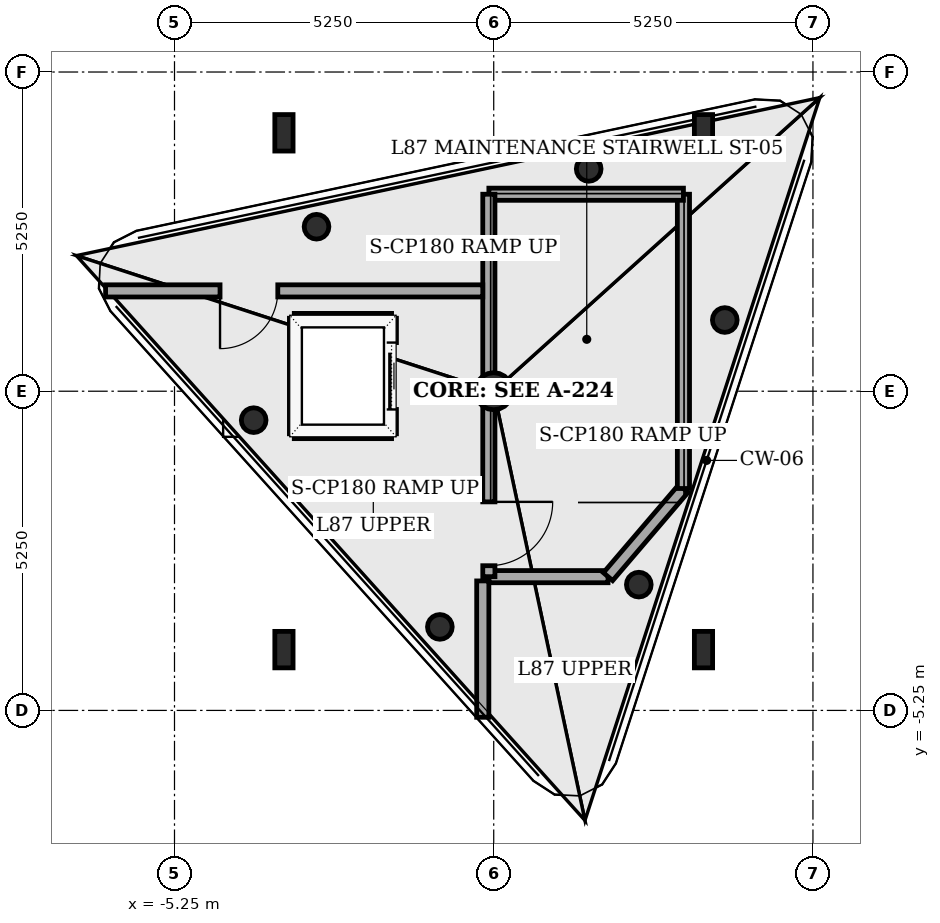
"""IFC4 building model, lengths in metres.
Left out: names, types, materials, properties, quantities, classifications, styles, units other than length and angle.
Written with IfcOpenShell. Run it as: python <this file> out.ifc"""

import sys

from ifc_helpers import new_model, si_unit, direction, frame, frame_2d, origin, origin_2d, place, context, subcontext, project, spatial, rectangle, hollow_circle, i_section, extrude, element, fill, save


model = new_model("IFC4")
c1 = context("Model", 3, precision=1e-05, world=origin(), true_north=direction((0.0, 1.0)))
c2 = subcontext(c1, "Body", "Model", "MODEL_VIEW")
j1 = project(units=[si_unit("LENGTHUNIT", "METRE"), si_unit("PLANEANGLEUNIT", "RADIAN")], contexts=[c1])
p1 = place(None, origin())
s1 = spatial("IfcSite", under=j1, at=p1, CompositionType="ELEMENT")
p2 = place(p1, origin())
s2 = spatial("IfcBuilding", under=s1, at=p2, CompositionType="ELEMENT")
p3 = place(p2, frame((0.0, 0.0, 339.2)))
s3 = spatial("IfcBuildingStorey", under=s2, at=p3, CompositionType="ELEMENT", Elevation=339.2)
for number, where, z_axis, x_axis in (
    (1, (-3.45, -4.25, 0.0), (0.0, 0.0, 1.0), (1.0, 0.0, 0.0)),
    (2, (3.45, -4.25, 0.0), (0.0, 0.0, 1.0), (1.0, 0.0, 0.0)),
    (3, (3.45, 4.25, 0.0), (0.0, 0.0, 1.0), (1.0, 0.0, 0.0)),
    (4, (-3.45, 4.25, 0.0), (0.0, 0.0, 1.0), (1.0, 0.0, 0.0)),
):
    element("IfcColumn", number, at=place(p3, frame(where, z_axis=z_axis, x_axis=x_axis)), inside=s3, PredefinedType="COLUMN", context=c2, shape_type="SweptSolid", body=[
        extrude(i_section(OverallWidth=0.3, OverallDepth=0.6, WebThickness=0.015, FlangeThickness=0.03, at=origin_2d()), origin(), (0.0, 0.0, 1.0), 4.2),
    ])
for number, where, z_axis, x_axis in (
    (5, (2.386, -3.181, 0.0), (0.0, 0.0, 1.0), (0.309, 0.951, 0.0)),
    (6, (3.8, 1.171, 0.0), (0.0, 0.0, 1.0), (0.309, 0.951, 0.0)),
    (7, (1.562, 3.657, 0.0), (0.0, 0.0, 1.0), (0.309, 0.951, 0.0)),
    (8, (-2.914, 2.706, 0.0), (0.0, 0.0, 1.0), (0.309, 0.951, 0.0)),
    (9, (-3.948, -0.476, 0.0), (0.0, 0.0, 1.0), (0.309, 0.951, 0.0)),
    (10, (-0.886, -3.876, 0.0), (0.0, 0.0, 1.0), (0.309, 0.951, 0.0)),
):
    element("IfcColumn", number, at=place(p3, frame(where, z_axis=z_axis, x_axis=x_axis)), inside=s3, PredefinedType="COLUMN", context=c2, shape_type="SweptSolid", body=[
        extrude(hollow_circle(Radius=0.203, WallThickness=0.02, at=origin_2d()), origin(), (0.0, 0.0, 1.0), 4.2),
    ])
p4 = place(p3, frame((0.0, 0.0, 4.02), z_axis=(0.0, 0.0, 1.0), x_axis=(1.0, 0.0, 0.0)))
e11 = element("IfcColumn", 11, at=p4, inside=s3, PredefinedType="USERDEFINED", context=c2, shape_type="SweptSolid", body=[
    extrude(hollow_circle(Radius=0.305, WallThickness=0.03, at=origin_2d()), origin(), (0.0, 0.0, 1.0), 5.78),
])
p5 = place(p3, frame((-0.08, -3.05, 0.0), z_axis=(0.0, 0.0, 1.0), x_axis=(1.0, 0.0, 0.0)))
e12 = element("IfcWall", 12, at=p5, inside=s3, PredefinedType="SOLIDWALL", context=c2, shape_type="SweptSolid", body=[
    extrude(rectangle(XDim=1.96, YDim=0.2, at=frame_2d((0.98, 0.0))), origin(), (0.0, 0.0, 1.0), 2.185),
])
p6 = place(p3, frame((1.88, -3.05, 0.0), z_axis=(0.0, 0.0, 1.0), x_axis=(0.650011257585, 0.759924578503, 0.0)))
e13 = element("IfcWall", 13, at=p6, inside=s3, PredefinedType="SOLIDWALL", context=c2, shape_type="SweptSolid", body=[
    extrude(rectangle(XDim=1.908, YDim=0.2, at=frame_2d((0.954, 0.0))), origin(), (0.0, 0.0, 1.0), 2.505),
])
p7 = place(p3, frame((3.12, -1.6, 0.0), z_axis=(0.0, 0.0, 1.0), x_axis=(0.0, 1.0, 0.0)))
e14 = element("IfcWall", 14, at=p7, inside=s3, PredefinedType="SOLIDWALL", context=c2, shape_type="SweptSolid", body=[
    extrude(rectangle(XDim=4.84, YDim=0.2, at=frame_2d((2.42, 0.0))), origin(), (0.0, 0.0, 1.0), 2.505),
])
p8 = place(p3, frame((3.12, 3.24, 0.0), z_axis=(0.0, 0.0, 1.0), x_axis=(-1.0, 0.0, 0.0)))
e15 = element("IfcWall", 15, at=p8, inside=s3, PredefinedType="SOLIDWALL", context=c2, shape_type="SweptSolid", body=[
    extrude(rectangle(XDim=3.2, YDim=0.2, at=frame_2d((1.6, 0.0))), origin(), (0.0, 0.0, 1.0), 2.505),
])
p9 = place(p3, frame((-0.08, 3.24, 0.0), z_axis=(0.0, 0.0, 1.0), x_axis=(0.0, -1.0, 0.0)))
e16 = element("IfcWall", 16, at=p9, inside=s3, PredefinedType="SOLIDWALL", context=c2, shape_type="SweptSolid", body=[
    extrude(rectangle(XDim=6.29, YDim=0.2, at=frame_2d((3.145, 0.0))), origin(), (0.0, 0.0, 1.0), 2.185),
])
p10 = place(p9, frame((5.06, 0.0, 0.0)))
e17 = element("IfcOpeningElement", 17, at=p10, cuts=e16, PredefinedType="OPENING", context=c2, shape_type="SweptSolid", body=[
    extrude(rectangle(XDim=1.05, YDim=2.135, at=frame_2d((0.525, 1.067))), frame((0.0, 0.11, 0.0), z_axis=(0.0, -1.0, 0.0), x_axis=(1.0, 0.0, 0.0)), (0.0, 0.0, 1.0), 0.22),
])
p11 = place(p3, frame((-3.28, -0.7, 0.0), z_axis=(0.0, 0.0, 1.0), x_axis=(0.0, 1.0, 0.0)))
e18 = element("IfcWall", 18, at=p11, inside=s3, PredefinedType="SOLIDWALL", context=c2, shape_type="SweptSolid", body=[
    extrude(rectangle(XDim=1.9, YDim=0.16, at=frame_2d((0.95, 0.0))), origin(), (0.0, 0.0, 1.0), 2.185),
])
for number, where, z_axis, x_axis in (
    (19, (-3.28, 1.2, 0.0), (0.0, 0.0, 1.0), (1.0, 0.0, 0.0)),
    (20, (-1.68, -0.7, 0.0), (0.0, 0.0, 1.0), (-1.0, 0.0, 0.0)),
):
    element("IfcWall", number, at=place(p3, frame(where, z_axis=z_axis, x_axis=x_axis)), inside=s3, PredefinedType="SOLIDWALL", context=c2, shape_type="SweptSolid", body=[
        extrude(rectangle(XDim=1.6, YDim=0.16, at=frame_2d((0.8, 0.0))), origin(), (0.0, 0.0, 1.0), 2.185),
    ])
p12 = place(p3, frame((-1.68, -0.7, 0.0), z_axis=(0.0, 0.0, 1.0), x_axis=(0.0, 1.0, 0.0)))
e21 = element("IfcWall", 21, at=p12, inside=s3, PredefinedType="SOLIDWALL", context=c2, shape_type="SweptSolid", body=[
    extrude(rectangle(XDim=1.9, YDim=0.16, at=frame_2d((0.95, 0.0))), origin(), (0.0, 0.0, 1.0), 2.185),
])
p13 = place(p12, frame((0.4, 0.0, 0.0)))
e22 = element("IfcOpeningElement", 22, at=p13, cuts=e21, PredefinedType="OPENING", context=c2, shape_type="SweptSolid", body=[
    extrude(rectangle(XDim=1.1, YDim=2.1, at=frame_2d((0.55, 1.05))), frame((0.0, 0.09, 0.0), z_axis=(0.0, -1.0, 0.0), x_axis=(1.0, 0.0, 0.0)), (0.0, 0.0, 1.0), 0.18),
])
p14 = place(p3, frame((-0.18, 1.65, 0.0), z_axis=(0.0, 0.0, 1.0), x_axis=(-1.0, 0.0, 0.0)))
e23 = element("IfcWall", 23, at=p14, inside=s3, PredefinedType="SOLIDWALL", context=c2, shape_type="SweptSolid", body=[
    extrude(rectangle(XDim=6.203, YDim=0.2, at=frame_2d((3.102, 0.0))), origin(), (0.0, 0.0, 1.0), 2.185),
])
p15 = place(p14, frame((3.371, 0.0, 0.0)))
e24 = element("IfcOpeningElement", 24, at=p15, cuts=e23, PredefinedType="OPENING", context=c2, shape_type="SweptSolid", body=[
    extrude(rectangle(XDim=0.95, YDim=2.1, at=frame_2d((0.475, 1.05))), frame((0.0, 0.11, 0.0), z_axis=(0.0, -1.0, 0.0), x_axis=(1.0, 0.0, 0.0)), (0.0, 0.0, 1.0), 0.22),
])
p16 = place(p3, frame((-0.18, -5.363, 0.0), z_axis=(0.0, 0.0, 1.0), x_axis=(0.0, 1.0, 0.0)))
e25 = element("IfcWall", 25, at=p16, inside=s3, PredefinedType="SOLIDWALL", context=c2, shape_type="SweptSolid", body=[
    extrude(rectangle(XDim=2.243, YDim=0.2, at=frame_2d((1.121, 0.0))), origin(), (0.0, 0.0, 1.0), 2.605),
])
p17 = place(p10, origin())
e26 = element("IfcDoor", 26, at=p17, inside=s3, OperationType="SINGLE_SWING_LEFT", PredefinedType="DOOR", context=c2, shape_type="SweptSolid", body=[
    extrude(rectangle(XDim=1.05, YDim=2.135, at=frame_2d((0.525, 1.067))), frame((0.0, 0.025, 0.0), z_axis=(0.0, -1.0, 0.0), x_axis=(1.0, 0.0, 0.0)), (0.0, 0.0, 1.0), 0.05),
])
fill(e17, e26)
p18 = place(p13, origin())
e27 = element("IfcDoor", 27, at=p18, inside=s3, OperationType="SLIDING_TO_LEFT", PredefinedType="DOOR", context=c2, shape_type="SweptSolid", body=[
    extrude(rectangle(XDim=1.1, YDim=2.1, at=frame_2d((0.55, 1.05))), frame((0.0, 0.025, 0.0), z_axis=(0.0, -1.0, 0.0), x_axis=(1.0, 0.0, 0.0)), (0.0, 0.0, 1.0), 0.05),
])
fill(e22, e27)
p19 = place(p15, origin())
e28 = element("IfcDoor", 28, at=p19, inside=s3, OperationType="SINGLE_SWING_RIGHT", PredefinedType="DOOR", context=c2, shape_type="SweptSolid", body=[
    extrude(rectangle(XDim=0.95, YDim=2.1, at=frame_2d((0.475, 1.05))), frame((0.0, 0.025, 0.0), z_axis=(0.0, -1.0, 0.0), x_axis=(1.0, 0.0, 0.0)), (0.0, 0.0, 1.0), 0.05),
])
fill(e24, e28)
save(model, sys.argv[1])
